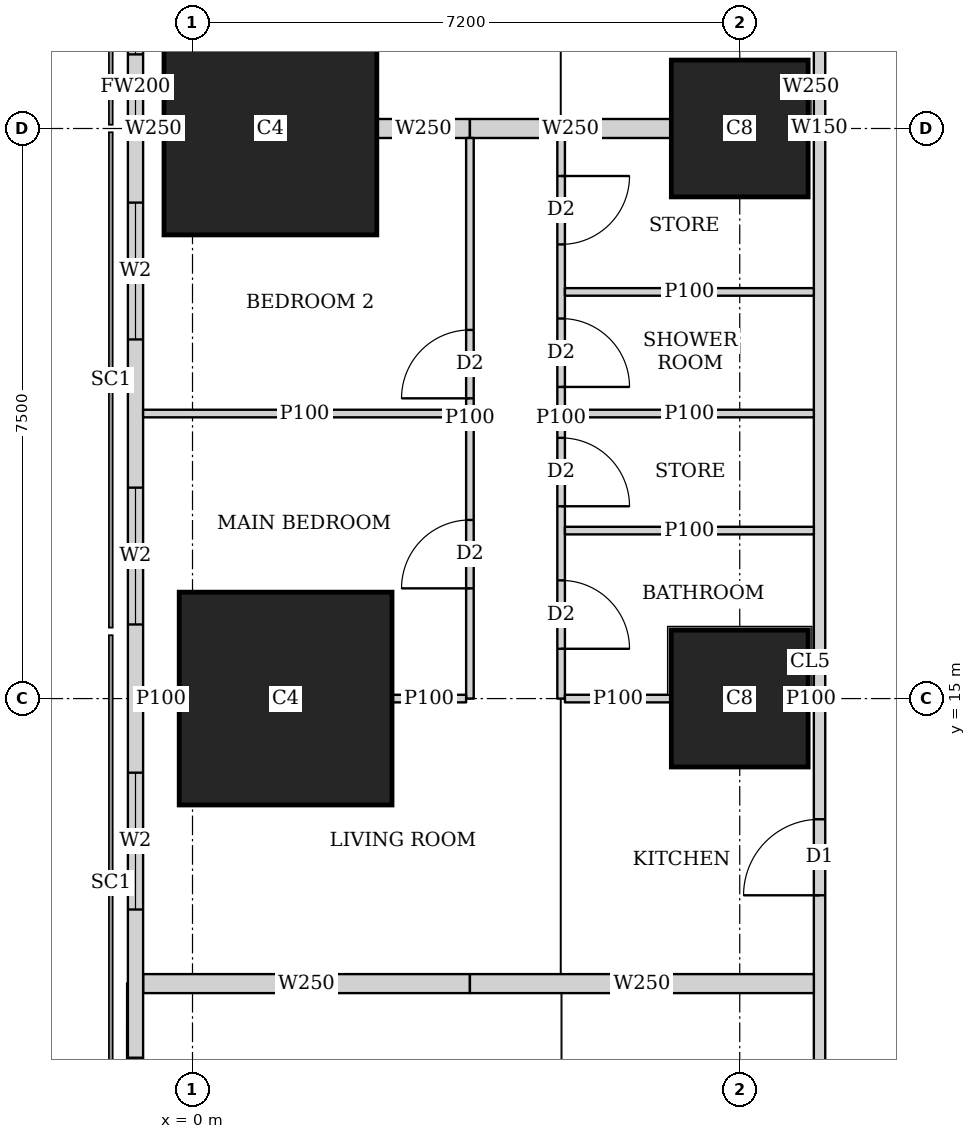
"""IFC4 building model, lengths in metres.
Left out: names, types, materials, properties, quantities, classifications, styles, units other than length and angle.
Written with IfcOpenShell. Run it as: python <this file> out.ifc"""

import sys

from ifc_helpers import new_model, si_unit, direction, frame, frame_2d, origin, origin_2d, place, context, subcontext, project, spatial, rectangle, extrude, element, fill, save


model = new_model("IFC4")
c1 = context("Model", 3, precision=1e-05, world=origin(), true_north=direction((0.0, 1.0)))
c2 = subcontext(c1, "Body", "Model", "MODEL_VIEW")
j1 = project(units=[si_unit("LENGTHUNIT", "METRE"), si_unit("PLANEANGLEUNIT", "RADIAN")], contexts=[c1])
p1 = place(None, origin())
s1 = spatial("IfcSite", under=j1, at=p1, CompositionType="ELEMENT")
p2 = place(p1, origin())
s2 = spatial("IfcBuilding", under=s1, at=p2, CompositionType="ELEMENT")
p3 = place(p2, frame((0.0, 0.0, 53.75)))
s3 = spatial("IfcBuildingStorey", under=s2, at=p3, CompositionType="ELEMENT", Elevation=53.75)
p4 = place(p3, frame((1.225, 15.0, 0.0), z_axis=(0.0, 0.0, 1.0), x_axis=(1.0, 0.0, 0.0)))
e1 = element("IfcColumn", 1, at=p4, inside=s3, PredefinedType="COLUMN", context=c2, shape_type="SweptSolid", body=[
    extrude(rectangle(XDim=2.8, YDim=2.8, at=origin_2d()), origin(), (0.0, 0.0, 1.0), 3.75),
])
p5 = place(p3, frame((7.2, 15.0, 0.0), z_axis=(0.0, 0.0, 1.0), x_axis=(1.0, 0.0, 0.0)))
e2 = element("IfcColumn", 2, at=p5, inside=s3, PredefinedType="COLUMN", context=c2, shape_type="SweptSolid", body=[
    extrude(rectangle(XDim=1.8, YDim=1.8, at=origin_2d()), origin(), (0.0, 0.0, 1.0), 3.75),
])
p6 = place(p3, frame((1.025, 22.5, 0.0), z_axis=(0.0, 0.0, 1.0), x_axis=(1.0, 0.0, 0.0)))
e3 = element("IfcColumn", 3, at=p6, inside=s3, PredefinedType="COLUMN", context=c2, shape_type="SweptSolid", body=[
    extrude(rectangle(XDim=2.8, YDim=2.8, at=origin_2d()), origin(), (0.0, 0.0, 1.0), 3.75),
])
p7 = place(p3, frame((7.2, 22.5, 0.0), z_axis=(0.0, 0.0, 1.0), x_axis=(1.0, 0.0, 0.0)))
e4 = element("IfcColumn", 4, at=p7, inside=s3, PredefinedType="COLUMN", context=c2, shape_type="SweptSolid", body=[
    extrude(rectangle(XDim=1.8, YDim=1.8, at=origin_2d()), origin(), (0.0, 0.0, 1.0), 3.75),
])
p8 = place(p3, frame((-0.75, 42.837, 0.0), z_axis=(0.0, 0.0, 1.0), x_axis=(0.0, -1.0, 0.0)))
e5 = element("IfcWall", 5, at=p8, inside=s3, PredefinedType="SOLIDWALL", context=c2, shape_type="SweptSolid", body=[
    extrude(rectangle(XDim=40.674, YDim=0.2, at=frame_2d((20.337, 0.0))), origin(), (0.0, 0.0, 1.0), 3.5),
])
p9 = place(p8, frame((1.78, 0.0, 0.9)))
e6 = element("IfcOpeningElement", 6, at=p9, cuts=e5, PredefinedType="OPENING", context=c2, shape_type="SweptSolid", body=[
    extrude(rectangle(XDim=1.8, YDim=1.5, at=frame_2d((0.9, 0.75))), frame((0.0, 0.11, 0.0), z_axis=(0.0, -1.0, 0.0), x_axis=(1.0, 0.0, 0.0)), (0.0, 0.0, 1.0), 0.22),
])
p10 = place(p8, frame((6.312, 0.0, 0.9)))
e7 = element("IfcOpeningElement", 7, at=p10, cuts=e5, PredefinedType="OPENING", context=c2, shape_type="SweptSolid", body=[
    extrude(rectangle(XDim=1.8, YDim=1.5, at=frame_2d((0.9, 0.75))), frame((0.0, 0.11, 0.0), z_axis=(0.0, -1.0, 0.0), x_axis=(1.0, 0.0, 0.0)), (0.0, 0.0, 1.0), 0.22),
])
p11 = place(p8, frame((10.062, 0.0, 0.9)))
e8 = element("IfcOpeningElement", 8, at=p11, cuts=e5, PredefinedType="OPENING", context=c2, shape_type="SweptSolid", body=[
    extrude(rectangle(XDim=1.8, YDim=1.5, at=frame_2d((0.9, 0.75))), frame((0.0, 0.11, 0.0), z_axis=(0.0, -1.0, 0.0), x_axis=(1.0, 0.0, 0.0)), (0.0, 0.0, 1.0), 0.22),
])
p12 = place(p8, frame((13.812, 0.0, 0.9)))
e9 = element("IfcOpeningElement", 9, at=p12, cuts=e5, PredefinedType="OPENING", context=c2, shape_type="SweptSolid", body=[
    extrude(rectangle(XDim=1.8, YDim=1.5, at=frame_2d((0.9, 0.75))), frame((0.0, 0.11, 0.0), z_axis=(0.0, -1.0, 0.0), x_axis=(1.0, 0.0, 0.0)), (0.0, 0.0, 1.0), 0.22),
])
p13 = place(p8, frame((17.562, 0.0, 0.9)))
e10 = element("IfcOpeningElement", 10, at=p13, cuts=e5, PredefinedType="OPENING", context=c2, shape_type="SweptSolid", body=[
    extrude(rectangle(XDim=1.8, YDim=1.5, at=frame_2d((0.9, 0.75))), frame((0.0, 0.11, 0.0), z_axis=(0.0, -1.0, 0.0), x_axis=(1.0, 0.0, 0.0)), (0.0, 0.0, 1.0), 0.22),
])
p14 = place(p8, frame((21.312, 0.0, 0.9)))
e11 = element("IfcOpeningElement", 11, at=p14, cuts=e5, PredefinedType="OPENING", context=c2, shape_type="SweptSolid", body=[
    extrude(rectangle(XDim=1.8, YDim=1.5, at=frame_2d((0.9, 0.75))), frame((0.0, 0.11, 0.0), z_axis=(0.0, -1.0, 0.0), x_axis=(1.0, 0.0, 0.0)), (0.0, 0.0, 1.0), 0.22),
])
p15 = place(p8, frame((25.062, 0.0, 0.9)))
e12 = element("IfcOpeningElement", 12, at=p15, cuts=e5, PredefinedType="OPENING", context=c2, shape_type="SweptSolid", body=[
    extrude(rectangle(XDim=1.8, YDim=1.5, at=frame_2d((0.9, 0.75))), frame((0.0, 0.11, 0.0), z_axis=(0.0, -1.0, 0.0), x_axis=(1.0, 0.0, 0.0)), (0.0, 0.0, 1.0), 0.22),
])
p16 = place(p8, frame((28.812, 0.0, 0.9)))
e13 = element("IfcOpeningElement", 13, at=p16, cuts=e5, PredefinedType="OPENING", context=c2, shape_type="SweptSolid", body=[
    extrude(rectangle(XDim=1.8, YDim=1.5, at=frame_2d((0.9, 0.75))), frame((0.0, 0.11, 0.0), z_axis=(0.0, -1.0, 0.0), x_axis=(1.0, 0.0, 0.0)), (0.0, 0.0, 1.0), 0.22),
])
p17 = place(p8, frame((32.562, 0.0, 0.9)))
e14 = element("IfcOpeningElement", 14, at=p17, cuts=e5, PredefinedType="OPENING", context=c2, shape_type="SweptSolid", body=[
    extrude(rectangle(XDim=1.8, YDim=1.5, at=frame_2d((0.9, 0.75))), frame((0.0, 0.11, 0.0), z_axis=(0.0, -1.0, 0.0), x_axis=(1.0, 0.0, 0.0)), (0.0, 0.0, 1.0), 0.22),
])
p18 = place(p8, frame((37.094, 0.0, 0.9)))
e15 = element("IfcOpeningElement", 15, at=p18, cuts=e5, PredefinedType="OPENING", context=c2, shape_type="SweptSolid", body=[
    extrude(rectangle(XDim=1.8, YDim=1.5, at=frame_2d((0.9, 0.75))), frame((0.0, 0.11, 0.0), z_axis=(0.0, -1.0, 0.0), x_axis=(1.0, 0.0, 0.0)), (0.0, 0.0, 1.0), 0.22),
])
p19 = place(p3, frame((8.25, 2.426, 0.0), z_axis=(0.0, 0.0, 1.0), x_axis=(0.0, 1.0, 0.0)))
e16 = element("IfcWall", 16, at=p19, inside=s3, PredefinedType="SOLIDWALL", context=c2, shape_type="SweptSolid", body=[
    extrude(rectangle(XDim=40.173, YDim=0.15, at=frame_2d((20.086, 0.0))), origin(), (0.0, 0.0, 1.0), 3.5),
])
p20 = place(p19, frame((6.661, 0.0, 0.0)))
e17 = element("IfcOpeningElement", 17, at=p20, cuts=e16, PredefinedType="OPENING", context=c2, shape_type="SweptSolid", body=[
    extrude(rectangle(XDim=1.0, YDim=2.1, at=frame_2d((0.5, 1.05))), frame((0.0, 0.085, 0.0), z_axis=(0.0, -1.0, 0.0), x_axis=(1.0, 0.0, 0.0)), (0.0, 0.0, 1.0), 0.17),
])
p21 = place(p19, frame((9.986, 0.0, 0.0)))
e18 = element("IfcOpeningElement", 18, at=p21, cuts=e16, PredefinedType="OPENING", context=c2, shape_type="SweptSolid", body=[
    extrude(rectangle(XDim=1.0, YDim=2.1, at=frame_2d((0.5, 1.05))), frame((0.0, 0.085, 0.0), z_axis=(0.0, -1.0, 0.0), x_axis=(1.0, 0.0, 0.0)), (0.0, 0.0, 1.0), 0.17),
])
p22 = place(p19, frame((21.662, 0.0, 0.0)))
e19 = element("IfcOpeningElement", 19, at=p22, cuts=e16, PredefinedType="OPENING", context=c2, shape_type="SweptSolid", body=[
    extrude(rectangle(XDim=1.0, YDim=2.1, at=frame_2d((0.5, 1.05))), frame((0.0, 0.085, 0.0), z_axis=(0.0, -1.0, 0.0), x_axis=(1.0, 0.0, 0.0)), (0.0, 0.0, 1.0), 0.17),
])
p23 = place(p19, frame((29.161, 0.0, 0.0)))
e20 = element("IfcOpeningElement", 20, at=p23, cuts=e16, PredefinedType="OPENING", context=c2, shape_type="SweptSolid", body=[
    extrude(rectangle(XDim=1.0, YDim=2.1, at=frame_2d((0.5, 1.05))), frame((0.0, 0.085, 0.0), z_axis=(0.0, -1.0, 0.0), x_axis=(1.0, 0.0, 0.0)), (0.0, 0.0, 1.0), 0.17),
])
p24 = place(p3, frame((3.65, 15.0, 0.0), z_axis=(0.0, 0.0, 1.0), x_axis=(0.0, 1.0, 0.0)))
e21 = element("IfcWall", 21, at=p24, inside=s3, PredefinedType="PARTITIONING", context=c2, shape_type="SweptSolid", body=[
    extrude(rectangle(XDim=7.375, YDim=0.1, at=frame_2d((3.688, 0.0))), origin(), (0.0, 0.0, 1.0), 3.5),
])
p25 = place(p24, frame((1.45, 0.0, 0.0)))
e22 = element("IfcOpeningElement", 22, at=p25, cuts=e21, PredefinedType="OPENING", context=c2, shape_type="SweptSolid", body=[
    extrude(rectangle(XDim=0.9, YDim=2.1, at=frame_2d((0.45, 1.05))), frame((0.0, 0.06, 0.0), z_axis=(0.0, -1.0, 0.0), x_axis=(1.0, 0.0, 0.0)), (0.0, 0.0, 1.0), 0.12),
])
p26 = place(p24, frame((3.95, 0.0, 0.0)))
e23 = element("IfcOpeningElement", 23, at=p26, cuts=e21, PredefinedType="OPENING", context=c2, shape_type="SweptSolid", body=[
    extrude(rectangle(XDim=0.9, YDim=2.1, at=frame_2d((0.45, 1.05))), frame((0.0, 0.06, 0.0), z_axis=(0.0, -1.0, 0.0), x_axis=(1.0, 0.0, 0.0)), (0.0, 0.0, 1.0), 0.12),
])
p27 = place(p3, frame((4.85, 15.0, 0.0), z_axis=(0.0, 0.0, 1.0), x_axis=(0.0, 1.0, 0.0)))
e24 = element("IfcWall", 24, at=p27, inside=s3, PredefinedType="PARTITIONING", context=c2, shape_type="SweptSolid", body=[
    extrude(rectangle(XDim=7.375, YDim=0.1, at=frame_2d((3.688, 0.0))), origin(), (0.0, 0.0, 1.0), 3.5),
])
p28 = place(p27, frame((0.655, 0.0, 0.0)))
e25 = element("IfcOpeningElement", 25, at=p28, cuts=e24, PredefinedType="OPENING", context=c2, shape_type="SweptSolid", body=[
    extrude(rectangle(XDim=0.9, YDim=2.1, at=frame_2d((0.45, 1.05))), frame((0.0, 0.06, 0.0), z_axis=(0.0, -1.0, 0.0), x_axis=(1.0, 0.0, 0.0)), (0.0, 0.0, 1.0), 0.12),
])
p29 = place(p27, frame((4.1, 0.0, 0.0)))
e26 = element("IfcOpeningElement", 26, at=p29, cuts=e24, PredefinedType="OPENING", context=c2, shape_type="SweptSolid", body=[
    extrude(rectangle(XDim=0.9, YDim=2.1, at=frame_2d((0.45, 1.05))), frame((0.0, 0.06, 0.0), z_axis=(0.0, -1.0, 0.0), x_axis=(1.0, 0.0, 0.0)), (0.0, 0.0, 1.0), 0.12),
])
p30 = place(p27, frame((2.53, 0.0, 0.0)))
e27 = element("IfcOpeningElement", 27, at=p30, cuts=e24, PredefinedType="OPENING", context=c2, shape_type="SweptSolid", body=[
    extrude(rectangle(XDim=0.9, YDim=2.1, at=frame_2d((0.45, 1.05))), frame((0.0, 0.06, 0.0), z_axis=(0.0, -1.0, 0.0), x_axis=(1.0, 0.0, 0.0)), (0.0, 0.0, 1.0), 0.12),
])
p31 = place(p27, frame((5.975, 0.0, 0.0)))
e28 = element("IfcOpeningElement", 28, at=p31, cuts=e24, PredefinedType="OPENING", context=c2, shape_type="SweptSolid", body=[
    extrude(rectangle(XDim=0.9, YDim=2.1, at=frame_2d((0.45, 1.05))), frame((0.0, 0.06, 0.0), z_axis=(0.0, -1.0, 0.0), x_axis=(1.0, 0.0, 0.0)), (0.0, 0.0, 1.0), 0.12),
])
p32 = place(p3, frame((-0.65, 15.0, 0.0), z_axis=(0.0, 0.0, 1.0), x_axis=(1.0, 0.0, 0.0)))
e29 = element("IfcWall", 29, at=p32, inside=s3, PredefinedType="PARTITIONING", context=c2, shape_type="SweptSolid", body=[
    extrude(rectangle(XDim=0.474, YDim=0.1, at=frame_2d((0.237, 0.0))), origin(), (0.0, 0.0, 1.0), 3.5),
])
p33 = place(p3, frame((2.626, 15.0, 0.0), z_axis=(0.0, 0.0, 1.0), x_axis=(1.0, 0.0, 0.0)))
e30 = element("IfcWall", 30, at=p33, inside=s3, PredefinedType="PARTITIONING", context=c2, shape_type="SweptSolid", body=[
    extrude(rectangle(XDim=0.974, YDim=0.1, at=frame_2d((0.487, 0.0))), origin(), (0.0, 0.0, 1.0), 3.5),
])
p34 = place(p3, frame((-0.65, 18.75, 0.0), z_axis=(0.0, 0.0, 1.0), x_axis=(1.0, 0.0, 0.0)))
e31 = element("IfcWall", 31, at=p34, inside=s3, PredefinedType="PARTITIONING", context=c2, shape_type="SweptSolid", body=[
    extrude(rectangle(XDim=4.25, YDim=0.1, at=frame_2d((2.125, 0.0))), origin(), (0.0, 0.0, 1.0), 2.05),
])
p35 = place(p3, frame((4.9, 15.0, 0.0), z_axis=(0.0, 0.0, 1.0), x_axis=(1.0, 0.0, 0.0)))
e32 = element("IfcWall", 32, at=p35, inside=s3, PredefinedType="PARTITIONING", context=c2, shape_type="SweptSolid", body=[
    extrude(rectangle(XDim=1.399, YDim=0.1, at=frame_2d((0.7, 0.0))), origin(), (0.0, 0.0, 1.0), 3.5),
])
p36 = place(p3, frame((8.101, 15.0, 0.0), z_axis=(0.0, 0.0, 1.0), x_axis=(1.0, 0.0, 0.0)))
e33 = element("IfcWall", 33, at=p36, inside=s3, PredefinedType="PARTITIONING", context=c2, shape_type="SweptSolid", body=[
    extrude(rectangle(XDim=0.074, YDim=0.1, at=frame_2d((0.037, 0.0))), origin(), (0.0, 0.0, 1.0), 3.5),
])
for number, where, z_axis, x_axis in (
    (34, (4.9, 18.75, 0.0), (0.0, 0.0, 1.0), (1.0, 0.0, 0.0)),
    (35, (4.9, 17.21, 0.0), (0.0, 0.0, 1.0), (1.0, 0.0, 0.0)),
    (36, (4.9, 20.35, 0.0), (0.0, 0.0, 1.0), (1.0, 0.0, 0.0)),
):
    element("IfcWall", number, at=place(p3, frame(where, z_axis=z_axis, x_axis=x_axis)), inside=s3, PredefinedType="PARTITIONING", context=c2, shape_type="SweptSolid", body=[
        extrude(rectangle(XDim=3.275, YDim=0.1, at=frame_2d((1.638, 0.0))), origin(), (0.0, 0.0, 1.0), 3.5),
    ])
p37 = place(p3, frame((-0.65, 11.25, 0.0), z_axis=(0.0, 0.0, 1.0), x_axis=(1.0, 0.0, 0.0)))
e37 = element("IfcWall", 37, at=p37, inside=s3, PredefinedType="SOLIDWALL", context=c2, shape_type="SweptSolid", body=[
    extrude(rectangle(XDim=4.3, YDim=0.25, at=frame_2d((2.15, 0.0))), origin(), (0.0, 0.0, 1.0), 2.05),
])
p38 = place(p3, frame((3.65, 11.25, 0.0), z_axis=(0.0, 0.0, 1.0), x_axis=(1.0, 0.0, 0.0)))
e38 = element("IfcWall", 38, at=p38, inside=s3, PredefinedType="SOLIDWALL", context=c2, shape_type="SweptSolid", body=[
    extrude(rectangle(XDim=4.525, YDim=0.25, at=frame_2d((2.263, 0.0))), origin(), (0.0, 0.0, 1.0), 3.5),
])
p39 = place(p3, frame((-0.65, 22.5, 0.0), z_axis=(0.0, 0.0, 1.0), x_axis=(1.0, 0.0, 0.0)))
e39 = element("IfcWall", 39, at=p39, inside=s3, PredefinedType="SOLIDWALL", context=c2, shape_type="SweptSolid", body=[
    extrude(rectangle(XDim=0.274, YDim=0.25, at=frame_2d((0.137, 0.0))), origin(), (0.0, 0.0, 1.0), 3.5),
])
p40 = place(p3, frame((2.426, 22.5, 0.0), z_axis=(0.0, 0.0, 1.0), x_axis=(1.0, 0.0, 0.0)))
e40 = element("IfcWall", 40, at=p40, inside=s3, PredefinedType="SOLIDWALL", context=c2, shape_type="SweptSolid", body=[
    extrude(rectangle(XDim=1.224, YDim=0.25, at=frame_2d((0.612, 0.0))), origin(), (0.0, 0.0, 1.0), 3.5),
])
p41 = place(p3, frame((3.65, 22.5, 0.0), z_axis=(0.0, 0.0, 1.0), x_axis=(1.0, 0.0, 0.0)))
e41 = element("IfcWall", 41, at=p41, inside=s3, PredefinedType="SOLIDWALL", context=c2, shape_type="SweptSolid", body=[
    extrude(rectangle(XDim=2.649, YDim=0.25, at=frame_2d((1.325, 0.0))), origin(), (0.0, 0.0, 1.0), 3.5),
])
p42 = place(p3, frame((8.101, 22.5, 0.0), z_axis=(0.0, 0.0, 1.0), x_axis=(1.0, 0.0, 0.0)))
e42 = element("IfcWall", 42, at=p42, inside=s3, PredefinedType="SOLIDWALL", context=c2, shape_type="SweptSolid", body=[
    extrude(rectangle(XDim=0.074, YDim=0.25, at=frame_2d((0.037, 0.0))), origin(), (0.0, 0.0, 1.0), 3.5),
])
p43 = place(p13, origin())
e43 = element("IfcWindow", 43, at=p43, inside=s3, PartitioningType="SINGLE_PANEL", PredefinedType="WINDOW", context=c2, shape_type="SweptSolid", body=[
    extrude(rectangle(XDim=1.8, YDim=1.5, at=frame_2d((0.9, 0.75))), frame((0.0, 0.03, 0.0), z_axis=(0.0, -1.0, 0.0), x_axis=(1.0, 0.0, 0.0)), (0.0, 0.0, 1.0), 0.06),
])
fill(e10, e43)
p44 = place(p14, origin())
e44 = element("IfcWindow", 44, at=p44, inside=s3, PartitioningType="SINGLE_PANEL", PredefinedType="WINDOW", context=c2, shape_type="SweptSolid", body=[
    extrude(rectangle(XDim=1.8, YDim=1.5, at=frame_2d((0.9, 0.75))), frame((0.0, 0.03, 0.0), z_axis=(0.0, -1.0, 0.0), x_axis=(1.0, 0.0, 0.0)), (0.0, 0.0, 1.0), 0.06),
])
fill(e11, e44)
p45 = place(p15, origin())
e45 = element("IfcWindow", 45, at=p45, inside=s3, PartitioningType="SINGLE_PANEL", PredefinedType="WINDOW", context=c2, shape_type="SweptSolid", body=[
    extrude(rectangle(XDim=1.8, YDim=1.5, at=frame_2d((0.9, 0.75))), frame((0.0, 0.03, 0.0), z_axis=(0.0, -1.0, 0.0), x_axis=(1.0, 0.0, 0.0)), (0.0, 0.0, 1.0), 0.06),
])
fill(e12, e45)
p46 = place(p16, origin())
e46 = element("IfcWindow", 46, at=p46, inside=s3, PartitioningType="SINGLE_PANEL", PredefinedType="WINDOW", context=c2, shape_type="SweptSolid", body=[
    extrude(rectangle(XDim=1.8, YDim=1.5, at=frame_2d((0.9, 0.75))), frame((0.0, 0.03, 0.0), z_axis=(0.0, -1.0, 0.0), x_axis=(1.0, 0.0, 0.0)), (0.0, 0.0, 1.0), 0.06),
])
fill(e13, e46)
p47 = place(p17, origin())
e47 = element("IfcWindow", 47, at=p47, inside=s3, PartitioningType="SINGLE_PANEL", PredefinedType="WINDOW", context=c2, shape_type="SweptSolid", body=[
    extrude(rectangle(XDim=1.8, YDim=1.5, at=frame_2d((0.9, 0.75))), frame((0.0, 0.03, 0.0), z_axis=(0.0, -1.0, 0.0), x_axis=(1.0, 0.0, 0.0)), (0.0, 0.0, 1.0), 0.06),
])
fill(e14, e47)
p48 = place(p25, origin())
e48 = element("IfcDoor", 48, at=p48, inside=s3, OperationType="SINGLE_SWING_LEFT", PredefinedType="DOOR", context=c2, shape_type="SweptSolid", body=[
    extrude(rectangle(XDim=0.9, YDim=2.1, at=frame_2d((0.45, 1.05))), frame((0.0, 0.025, 0.0), z_axis=(0.0, -1.0, 0.0), x_axis=(1.0, 0.0, 0.0)), (0.0, 0.0, 1.0), 0.05),
])
fill(e22, e48)
p49 = place(p26, origin())
e49 = element("IfcDoor", 49, at=p49, inside=s3, OperationType="SINGLE_SWING_LEFT", PredefinedType="DOOR", context=c2, shape_type="SweptSolid", body=[
    extrude(rectangle(XDim=0.9, YDim=2.1, at=frame_2d((0.45, 1.05))), frame((0.0, 0.025, 0.0), z_axis=(0.0, -1.0, 0.0), x_axis=(1.0, 0.0, 0.0)), (0.0, 0.0, 1.0), 0.05),
])
fill(e23, e49)
p50 = place(p28, origin())
e50 = element("IfcDoor", 50, at=p50, inside=s3, OperationType="SINGLE_SWING_RIGHT", PredefinedType="DOOR", context=c2, shape_type="SweptSolid", body=[
    extrude(rectangle(XDim=0.9, YDim=2.1, at=frame_2d((0.45, 1.05))), frame((0.0, 0.025, 0.0), z_axis=(0.0, -1.0, 0.0), x_axis=(1.0, 0.0, 0.0)), (0.0, 0.0, 1.0), 0.05),
])
fill(e25, e50)
p51 = place(p29, origin())
e51 = element("IfcDoor", 51, at=p51, inside=s3, OperationType="SINGLE_SWING_RIGHT", PredefinedType="DOOR", context=c2, shape_type="SweptSolid", body=[
    extrude(rectangle(XDim=0.9, YDim=2.1, at=frame_2d((0.45, 1.05))), frame((0.0, 0.025, 0.0), z_axis=(0.0, -1.0, 0.0), x_axis=(1.0, 0.0, 0.0)), (0.0, 0.0, 1.0), 0.05),
])
fill(e26, e51)
p52 = place(p30, origin())
e52 = element("IfcDoor", 52, at=p52, inside=s3, OperationType="SINGLE_SWING_RIGHT", PredefinedType="DOOR", context=c2, shape_type="SweptSolid", body=[
    extrude(rectangle(XDim=0.9, YDim=2.1, at=frame_2d((0.45, 1.05))), frame((0.0, 0.025, 0.0), z_axis=(0.0, -1.0, 0.0), x_axis=(1.0, 0.0, 0.0)), (0.0, 0.0, 1.0), 0.05),
])
fill(e27, e52)
p53 = place(p31, origin())
e53 = element("IfcDoor", 53, at=p53, inside=s3, OperationType="SINGLE_SWING_LEFT", PredefinedType="DOOR", context=c2, shape_type="SweptSolid", body=[
    extrude(rectangle(XDim=0.9, YDim=2.1, at=frame_2d((0.45, 1.05))), frame((0.0, 0.025, 0.0), z_axis=(0.0, -1.0, 0.0), x_axis=(1.0, 0.0, 0.0)), (0.0, 0.0, 1.0), 0.05),
])
fill(e28, e53)
p54 = place(p21, origin())
e54 = element("IfcDoor", 54, at=p54, inside=s3, OperationType="SINGLE_SWING_LEFT", PredefinedType="DOOR", context=c2, shape_type="SweptSolid", body=[
    extrude(rectangle(XDim=1.0, YDim=2.1, at=frame_2d((0.5, 1.05))), frame((0.0, 0.025, 0.0), z_axis=(0.0, -1.0, 0.0), x_axis=(1.0, 0.0, 0.0)), (0.0, 0.0, 1.0), 0.05),
])
fill(e18, e54)
save(model, sys.argv[1])
